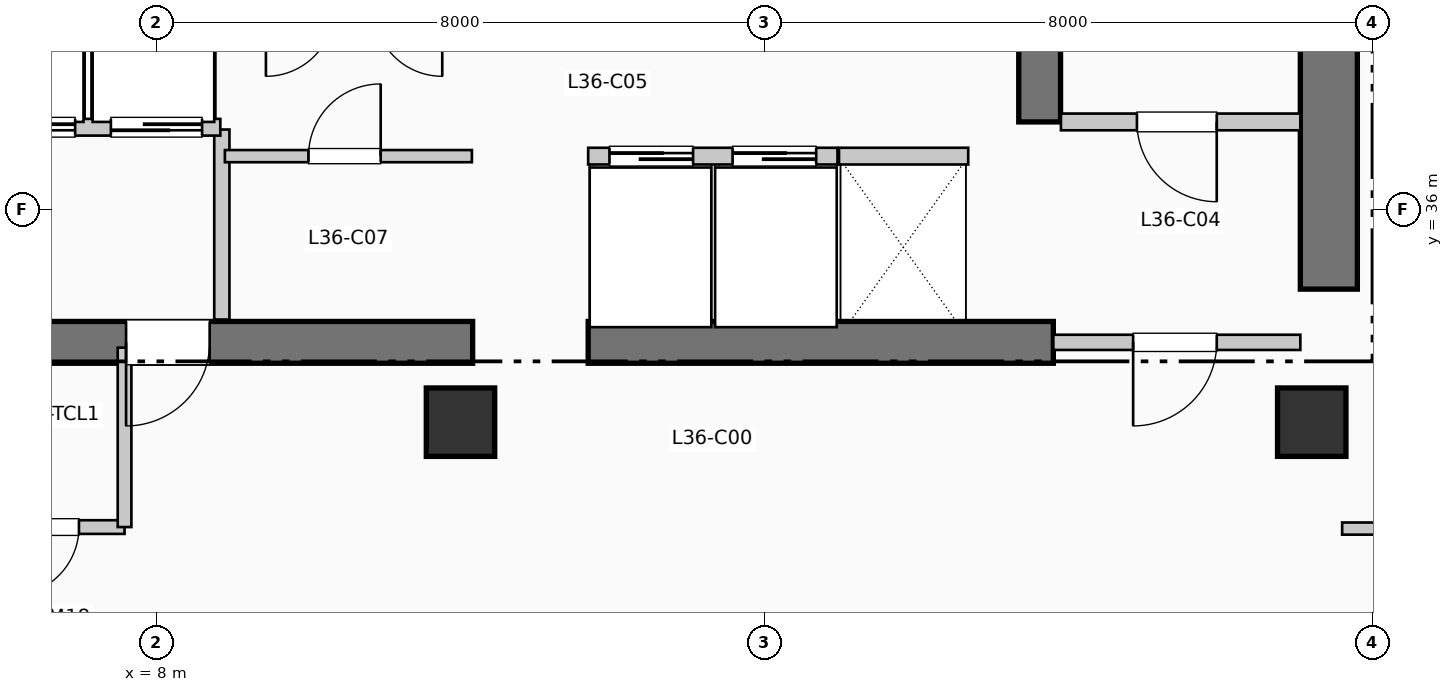
"""IFC4 building model, lengths in metres.
Left out: names, types, materials, properties, quantities, classifications, styles, units other than length and angle.
Written with IfcOpenShell. Run it as: python <this file> out.ifc"""

import sys

from ifc_helpers import new_model, si_unit, direction, frame, frame_2d, origin, origin_2d, place, context, subcontext, project, spatial, rectangle, extrude, element, fill, save


model = new_model("IFC4")
c1 = context("Model", 3, precision=1e-05, world=origin(), true_north=direction((0.0, 1.0)))
c2 = subcontext(c1, "Body", "Model", "MODEL_VIEW")
j1 = project(units=[si_unit("LENGTHUNIT", "METRE"), si_unit("PLANEANGLEUNIT", "RADIAN")], contexts=[c1])
p1 = place(None, origin())
s1 = spatial("IfcSite", under=j1, at=p1, CompositionType="ELEMENT")
p2 = place(p1, origin())
s2 = spatial("IfcBuilding", under=s1, at=p2, CompositionType="ELEMENT")
p3 = place(p2, frame((0.0, 0.0, 150.81)))
s3 = spatial("IfcBuildingStorey", under=s2, at=p3, CompositionType="ELEMENT", Elevation=150.81)
p4 = place(p3, frame((23.425, 34.95, 0.0), z_axis=(0.0, 0.0, 1.0), x_axis=(0.0, 1.0, 0.0)))
e1 = element("IfcWall", 1, at=p4, inside=s3, PredefinedType="SHEAR", context=c2, shape_type="SweptSolid", body=[
    extrude(rectangle(XDim=10.64, YDim=0.75, at=frame_2d((5.32, 0.0))), origin(), (0.0, 0.0, 1.0), 3.96),
])
p5 = place(p3, frame((1.45, 34.25, 0.0), z_axis=(0.0, 0.0, 1.0), x_axis=(1.0, 0.0, 0.0)))
e2 = element("IfcWall", 2, at=p5, inside=s3, PredefinedType="SHEAR", context=c2, shape_type="SweptSolid", body=[
    extrude(rectangle(XDim=10.71, YDim=0.55, at=frame_2d((5.355, 0.0))), origin(), (0.0, 0.0, 1.0), 3.96),
])
p6 = place(p5, frame((7.25, 0.0, 0.0), z_axis=(0.0, 0.0, 1.0), x_axis=(-1.0, 0.0, 0.0)))
e3 = element("IfcOpeningElement", 3, at=p6, cuts=e2, PredefinedType="OPENING", context=c2, shape_type="SweptSolid", body=[
    extrude(rectangle(XDim=1.1, YDim=2.15, at=frame_2d((0.55, 1.075))), frame((0.0, 0.285, 0.0), z_axis=(0.0, -1.0, 0.0), x_axis=(1.0, 0.0, 0.0)), (0.0, 0.0, 1.0), 0.57),
])
p7 = place(p3, frame((13.68, 34.25, 0.0), z_axis=(0.0, 0.0, 1.0), x_axis=(1.0, 0.0, 0.0)))
e4 = element("IfcWall", 4, at=p7, inside=s3, PredefinedType="SHEAR", context=c2, shape_type="SweptSolid", body=[
    extrude(rectangle(XDim=6.12, YDim=0.55, at=frame_2d((3.06, 0.0))), origin(), (0.0, 0.0, 1.0), 3.96),
])
p8 = place(p3, frame((19.62, 37.15, 0.0), z_axis=(0.0, 0.0, 1.0), x_axis=(0.0, 1.0, 0.0)))
e5 = element("IfcWall", 5, at=p8, inside=s3, PredefinedType="SHEAR", context=c2, shape_type="SweptSolid", body=[
    extrude(rectangle(XDim=7.89, YDim=0.55, at=frame_2d((3.945, 0.0))), origin(), (0.0, 0.0, 1.0), 3.96),
])
for number, where, z_axis, x_axis in (
    (6, (12.0, 33.2, 0.0), (0.0, 0.0, 1.0), (1.0, 0.0, 0.0)),
    (7, (23.2, 33.2, 0.0), (0.0, 0.0, 1.0), (1.0, 0.0, 0.0)),
):
    element("IfcColumn", number, at=place(p3, frame(where, z_axis=z_axis, x_axis=x_axis)), inside=s3, PredefinedType="COLUMN", context=c2, shape_type="SweptSolid", body=[
        extrude(rectangle(XDim=0.9, YDim=0.9, at=origin_2d()), origin(), (0.0, 0.0, 1.0), 3.96),
    ])
p9 = place(p3, frame((8.86, 34.55, 0.0), z_axis=(0.0, 0.0, 1.0), x_axis=(0.0, 1.0, 0.0)))
e8 = element("IfcWall", 8, at=p9, inside=s3, PredefinedType="PARTITIONING", context=c2, shape_type="SweptSolid", body=[
    extrude(rectangle(XDim=2.5, YDim=0.2, at=frame_2d((1.25, 0.0))), origin(), (0.0, 0.0, 1.0), 3.71),
])
p10 = place(p3, frame((19.9, 37.15, 0.0), z_axis=(0.0, 0.0, 1.0), x_axis=(1.0, 0.0, 0.0)))
e9 = element("IfcWall", 9, at=p10, inside=s3, PredefinedType="PARTITIONING", context=c2, shape_type="SweptSolid", body=[
    extrude(rectangle(XDim=3.15, YDim=0.22, at=frame_2d((1.575, 0.0))), origin(), (0.0, 0.0, 1.0), 3.71),
])
p11 = place(p10, frame((2.05, 0.0, 0.0), z_axis=(0.0, 0.0, 1.0), x_axis=(-1.0, 0.0, 0.0)))
e10 = element("IfcOpeningElement", 10, at=p11, cuts=e9, PredefinedType="OPENING", context=c2, shape_type="SweptSolid", body=[
    extrude(rectangle(XDim=1.05, YDim=2.15, at=frame_2d((0.525, 1.075))), frame((0.0, 0.12, 0.0), z_axis=(0.0, -1.0, 0.0), x_axis=(1.0, 0.0, 0.0)), (0.0, 0.0, 1.0), 0.24),
])
p12 = place(p3, frame((19.8, 34.25, 0.0), z_axis=(0.0, 0.0, 1.0), x_axis=(1.0, 0.0, 0.0)))
e11 = element("IfcWall", 11, at=p12, inside=s3, PredefinedType="PARTITIONING", context=c2, shape_type="SweptSolid", body=[
    extrude(rectangle(XDim=3.25, YDim=0.2, at=frame_2d((1.625, 0.0))), origin(), (0.0, 0.0, 1.0), 3.71),
])
p13 = place(p12, frame((2.15, 0.0, 0.0), z_axis=(0.0, 0.0, 1.0), x_axis=(-1.0, 0.0, 0.0)))
e12 = element("IfcOpeningElement", 12, at=p13, cuts=e11, PredefinedType="OPENING", context=c2, shape_type="SweptSolid", body=[
    extrude(rectangle(XDim=1.1, YDim=2.15, at=frame_2d((0.55, 1.075))), frame((0.0, 0.11, 0.0), z_axis=(0.0, -1.0, 0.0), x_axis=(1.0, 0.0, 0.0)), (0.0, 0.0, 1.0), 0.22),
])
p14 = place(p3, frame((5.38, 37.08, 0.0), z_axis=(0.0, 0.0, 1.0), x_axis=(1.0, 0.0, 0.0)))
e13 = element("IfcWall", 13, at=p14, inside=s3, PredefinedType="PARTITIONING", context=c2, shape_type="SweptSolid", body=[
    extrude(rectangle(XDim=3.46, YDim=0.22, at=frame_2d((1.73, 0.0))), origin(), (0.0, 0.0, 1.0), 3.71),
])
p15 = place(p14, frame((1.55, 0.0, 0.0), z_axis=(0.0, 0.0, 1.0), x_axis=(-1.0, 0.0, 0.0)))
e14 = element("IfcOpeningElement", 14, at=p15, cuts=e13, PredefinedType="OPENING", context=c2, shape_type="SweptSolid", body=[
    extrude(rectangle(XDim=1.2, YDim=2.2, at=frame_2d((0.6, 1.1))), frame((0.0, 0.12, 0.0), z_axis=(0.0, -1.0, 0.0), x_axis=(1.0, 0.0, 0.0)), (0.0, 0.0, 1.0), 0.24),
])
p16 = place(p14, frame((3.22, 0.0, 0.0), z_axis=(0.0, 0.0, 1.0), x_axis=(-1.0, 0.0, 0.0)))
e15 = element("IfcOpeningElement", 15, at=p16, cuts=e13, PredefinedType="OPENING", context=c2, shape_type="SweptSolid", body=[
    extrude(rectangle(XDim=1.2, YDim=2.2, at=frame_2d((0.6, 1.1))), frame((0.0, 0.12, 0.0), z_axis=(0.0, -1.0, 0.0), x_axis=(1.0, 0.0, 0.0)), (0.0, 0.0, 1.0), 0.24),
])
p17 = place(p3, frame((5.5, 31.82, 0.0), z_axis=(0.0, 0.0, 1.0), x_axis=(1.0, 0.0, 0.0)))
e16 = element("IfcWall", 16, at=p17, inside=s3, PredefinedType="PLUMBINGWALL", context=c2, shape_type="SweptSolid", body=[
    extrude(rectangle(XDim=2.08, YDim=0.18, at=frame_2d((1.04, 0.0))), origin(), (0.0, 0.0, 1.0), 3.71),
])
p18 = place(p17, frame((1.48, 0.0, 0.0), z_axis=(0.0, 0.0, 1.0), x_axis=(-1.0, 0.0, 0.0)))
e17 = element("IfcOpeningElement", 17, at=p18, cuts=e16, PredefinedType="OPENING", context=c2, shape_type="SweptSolid", body=[
    extrude(rectangle(XDim=0.9, YDim=2.1, at=frame_2d((0.45, 1.05))), frame((0.0, 0.1, 0.0), z_axis=(0.0, -1.0, 0.0), x_axis=(1.0, 0.0, 0.0)), (0.0, 0.0, 1.0), 0.2),
])
p19 = place(p3, frame((7.58, 31.82, 0.0), z_axis=(0.0, 0.0, 1.0), x_axis=(0.0, 1.0, 0.0)))
e18 = element("IfcWall", 18, at=p19, inside=s3, PredefinedType="PLUMBINGWALL", context=c2, shape_type="SweptSolid", body=[
    extrude(rectangle(XDim=2.36, YDim=0.18, at=frame_2d((1.18, 0.0))), origin(), (0.0, 0.0, 1.0), 3.71),
])
p20 = place(p3, frame((8.9, 36.7, 0.0), z_axis=(0.0, 0.0, 1.0), x_axis=(1.0, 0.0, 0.0)))
e19 = element("IfcWall", 19, at=p20, inside=s3, PredefinedType="PARTITIONING", context=c2, shape_type="SweptSolid", body=[
    extrude(rectangle(XDim=3.25, YDim=0.16, at=frame_2d((1.625, 0.0))), origin(), (0.0, 0.0, 1.0), 3.71),
])
p21 = place(p20, frame((1.1, 0.0, 0.0)))
e20 = element("IfcOpeningElement", 20, at=p21, cuts=e19, PredefinedType="OPENING", context=c2, shape_type="SweptSolid", body=[
    extrude(rectangle(XDim=0.95, YDim=2.15, at=frame_2d((0.475, 1.075))), frame((0.0, 0.09, 0.0), z_axis=(0.0, -1.0, 0.0), x_axis=(1.0, 0.0, 0.0)), (0.0, 0.0, 1.0), 0.18),
])
p22 = place(p3, frame((13.68, 36.7, 0.0), z_axis=(0.0, 0.0, 1.0), x_axis=(1.0, 0.0, 0.0)))
e21 = element("IfcWall", 21, at=p22, inside=s3, PredefinedType="PARTITIONING", context=c2, shape_type="SweptSolid", body=[
    extrude(rectangle(XDim=3.28, YDim=0.22, at=frame_2d((1.64, 0.0))), origin(), (0.0, 0.0, 1.0), 3.71),
])
p23 = place(p22, frame((0.28, 0.0, 0.0)))
e22 = element("IfcOpeningElement", 22, at=p23, cuts=e21, PredefinedType="OPENING", context=c2, shape_type="SweptSolid", body=[
    extrude(rectangle(XDim=1.1, YDim=2.2, at=frame_2d((0.55, 1.1))), frame((0.0, 0.12, 0.0), z_axis=(0.0, -1.0, 0.0), x_axis=(1.0, 0.0, 0.0)), (0.0, 0.0, 1.0), 0.24),
])
p24 = place(p22, frame((1.9, 0.0, 0.0)))
e23 = element("IfcOpeningElement", 23, at=p24, cuts=e21, PredefinedType="OPENING", context=c2, shape_type="SweptSolid", body=[
    extrude(rectangle(XDim=1.1, YDim=2.2, at=frame_2d((0.55, 1.1))), frame((0.0, 0.12, 0.0), z_axis=(0.0, -1.0, 0.0), x_axis=(1.0, 0.0, 0.0)), (0.0, 0.0, 1.0), 0.24),
])
p25 = place(p3, frame((16.98, 36.7, 0.0), z_axis=(0.0, 0.0, 1.0), x_axis=(1.0, 0.0, 0.0)))
e24 = element("IfcWall", 24, at=p25, inside=s3, PredefinedType="PARTITIONING", context=c2, shape_type="SweptSolid", body=[
    extrude(rectangle(XDim=1.7, YDim=0.22, at=frame_2d((0.85, 0.0))), origin(), (0.0, 0.0, 1.0), 3.71),
])
p26 = place(p3, frame((23.6, 31.8, 0.0), z_axis=(0.0, 0.0, 1.0), x_axis=(1.0, 0.0, 0.0)))
e25 = element("IfcWall", 25, at=p26, inside=s3, PredefinedType="PARTITIONING", context=c2, shape_type="SweptSolid", body=[
    extrude(rectangle(XDim=26.41, YDim=0.16, at=frame_2d((13.205, 0.0))), origin(), (0.0, 0.0, 1.0), 3.71),
])
p27 = place(p26, frame((6.156, 0.0, 0.0)))
e26 = element("IfcOpeningElement", 26, at=p27, cuts=e25, PredefinedType="OPENING", context=c2, shape_type="SweptSolid", body=[
    extrude(rectangle(XDim=0.95, YDim=2.15, at=frame_2d((0.475, 1.075))), frame((0.0, 0.09, 0.0), z_axis=(0.0, -1.0, 0.0), x_axis=(1.0, 0.0, 0.0)), (0.0, 0.0, 1.0), 0.18),
])
p28 = place(p26, frame((19.861, 0.0, 0.0)))
e27 = element("IfcOpeningElement", 27, at=p28, cuts=e25, PredefinedType="OPENING", context=c2, shape_type="SweptSolid", body=[
    extrude(rectangle(XDim=0.95, YDim=2.15, at=frame_2d((0.475, 1.075))), frame((0.0, 0.09, 0.0), z_axis=(0.0, -1.0, 0.0), x_axis=(1.0, 0.0, 0.0)), (0.0, 0.0, 1.0), 0.18),
])
p29 = place(p6, origin())
e28 = element("IfcDoor", 28, at=p29, inside=s3, OperationType="SINGLE_SWING_LEFT", PredefinedType="DOOR", context=c2, shape_type="SweptSolid", body=[
    extrude(rectangle(XDim=1.1, YDim=2.15, at=frame_2d((0.55, 1.075))), frame((0.0, 0.025, 0.0), z_axis=(0.0, -1.0, 0.0), x_axis=(1.0, 0.0, 0.0)), (0.0, 0.0, 1.0), 0.05),
])
fill(e3, e28)
p30 = place(p11, origin())
e29 = element("IfcDoor", 29, at=p30, inside=s3, OperationType="SINGLE_SWING_RIGHT", PredefinedType="DOOR", context=c2, shape_type="SweptSolid", body=[
    extrude(rectangle(XDim=1.05, YDim=2.15, at=frame_2d((0.525, 1.075))), frame((0.0, 0.025, 0.0), z_axis=(0.0, -1.0, 0.0), x_axis=(1.0, 0.0, 0.0)), (0.0, 0.0, 1.0), 0.05),
])
fill(e10, e29)
p31 = place(p13, origin())
e30 = element("IfcDoor", 30, at=p31, inside=s3, OperationType="SINGLE_SWING_LEFT", PredefinedType="DOOR", context=c2, shape_type="SweptSolid", body=[
    extrude(rectangle(XDim=1.1, YDim=2.15, at=frame_2d((0.55, 1.075))), frame((0.0, 0.025, 0.0), z_axis=(0.0, -1.0, 0.0), x_axis=(1.0, 0.0, 0.0)), (0.0, 0.0, 1.0), 0.05),
])
fill(e12, e30)
p32 = place(p15, origin())
e31 = element("IfcDoor", 31, at=p32, inside=s3, OperationType="SLIDING_TO_RIGHT", PredefinedType="DOOR", context=c2, shape_type="SweptSolid", body=[
    extrude(rectangle(XDim=1.2, YDim=2.2, at=frame_2d((0.6, 1.1))), frame((0.0, 0.025, 0.0), z_axis=(0.0, -1.0, 0.0), x_axis=(1.0, 0.0, 0.0)), (0.0, 0.0, 1.0), 0.05),
])
fill(e14, e31)
p33 = place(p16, origin())
e32 = element("IfcDoor", 32, at=p33, inside=s3, OperationType="SLIDING_TO_RIGHT", PredefinedType="DOOR", context=c2, shape_type="SweptSolid", body=[
    extrude(rectangle(XDim=1.2, YDim=2.2, at=frame_2d((0.6, 1.1))), frame((0.0, 0.025, 0.0), z_axis=(0.0, -1.0, 0.0), x_axis=(1.0, 0.0, 0.0)), (0.0, 0.0, 1.0), 0.05),
])
fill(e15, e32)
p34 = place(p18, origin())
e33 = element("IfcDoor", 33, at=p34, inside=s3, OperationType="SINGLE_SWING_LEFT", PredefinedType="DOOR", context=c2, shape_type="SweptSolid", body=[
    extrude(rectangle(XDim=0.9, YDim=2.1, at=frame_2d((0.45, 1.05))), frame((0.0, 0.025, 0.0), z_axis=(0.0, -1.0, 0.0), x_axis=(1.0, 0.0, 0.0)), (0.0, 0.0, 1.0), 0.05),
])
fill(e17, e33)
p35 = place(p21, origin())
e34 = element("IfcDoor", 34, at=p35, inside=s3, OperationType="SINGLE_SWING_RIGHT", PredefinedType="DOOR", context=c2, shape_type="SweptSolid", body=[
    extrude(rectangle(XDim=0.95, YDim=2.15, at=frame_2d((0.475, 1.075))), frame((0.0, 0.025, 0.0), z_axis=(0.0, -1.0, 0.0), x_axis=(1.0, 0.0, 0.0)), (0.0, 0.0, 1.0), 0.05),
])
fill(e20, e34)
p36 = place(p23, origin())
e35 = element("IfcDoor", 35, at=p36, inside=s3, OperationType="SLIDING_TO_RIGHT", PredefinedType="DOOR", context=c2, shape_type="SweptSolid", body=[
    extrude(rectangle(XDim=1.1, YDim=2.2, at=frame_2d((0.55, 1.1))), frame((0.0, 0.025, 0.0), z_axis=(0.0, -1.0, 0.0), x_axis=(1.0, 0.0, 0.0)), (0.0, 0.0, 1.0), 0.05),
])
fill(e22, e35)
p37 = place(p24, origin())
e36 = element("IfcDoor", 36, at=p37, inside=s3, OperationType="SLIDING_TO_RIGHT", PredefinedType="DOOR", context=c2, shape_type="SweptSolid", body=[
    extrude(rectangle(XDim=1.1, YDim=2.2, at=frame_2d((0.55, 1.1))), frame((0.0, 0.025, 0.0), z_axis=(0.0, -1.0, 0.0), x_axis=(1.0, 0.0, 0.0)), (0.0, 0.0, 1.0), 0.05),
])
fill(e23, e36)
save(model, sys.argv[1])
